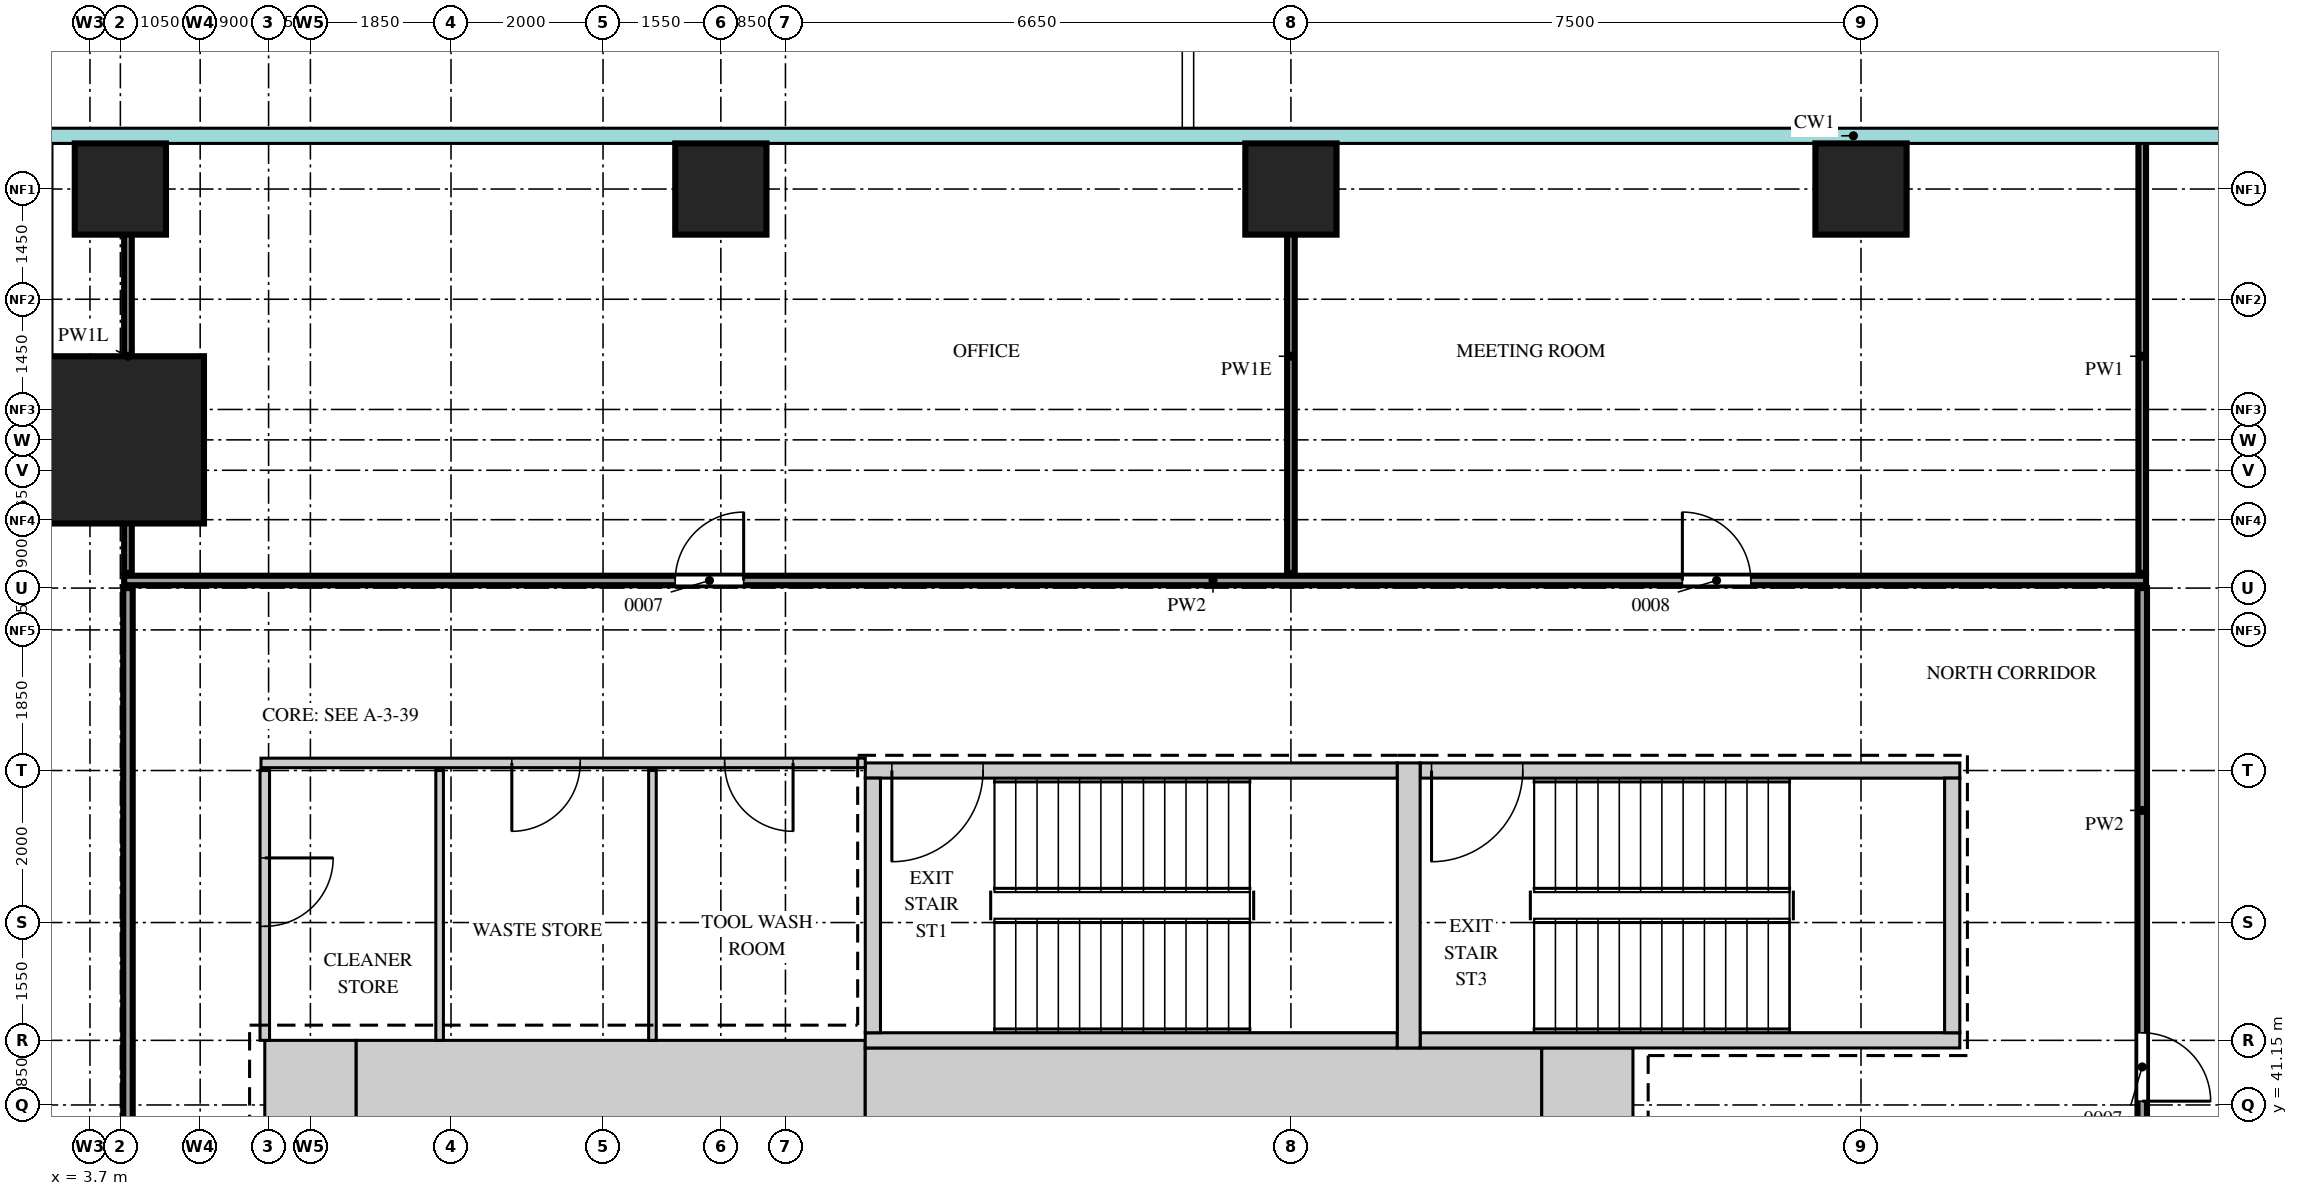
"""IFC4 building model, lengths in metres.
Left out: names, types, materials, properties, quantities, classifications, styles, units other than length and angle.
Written with IfcOpenShell. Run it as: python <this file> out.ifc"""

import sys

from ifc_helpers import new_model, si_unit, direction, frame, frame_2d, origin, origin_2d, place, context, subcontext, project, spatial, rectangle, extrude, source, transform, mapped, element, fill, save


model = new_model("IFC4")
c1 = context("Model", 3, precision=1e-05, world=origin(), true_north=direction((0.0, 1.0)))
c2 = subcontext(c1, "Body", "Model", "MODEL_VIEW")
j1 = project(units=[si_unit("LENGTHUNIT", "METRE"), si_unit("PLANEANGLEUNIT", "RADIAN")], contexts=[c1])
p1 = place(None, origin())
s1 = spatial("IfcSite", under=j1, at=p1, CompositionType="ELEMENT")
p2 = place(p1, origin())
s2 = spatial("IfcBuilding", under=s1, at=p2, CompositionType="ELEMENT")
p3 = place(p2, frame((0.0, 0.0, 69.0)))
s3 = spatial("IfcBuildingStorey", under=s2, at=p3, CompositionType="ELEMENT", Elevation=69.0)
m1 = source(origin(), c2, "Body", "SweptSolid", [
    extrude(rectangle(XDim=6.7, YDim=1.2, at=frame_2d((3.35, 0.0))), origin(), (0.0, 0.0, 1.0), 4.2),
])
p4 = place(p3, frame((7.2, 41.4, 0.0), z_axis=(0.0, 0.0, 1.0), x_axis=(1.0, 0.0, 0.0)))
e1 = element("IfcWall", 1, at=p4, inside=s3, PredefinedType="SHEAR", context=c2, shape_type="MappedRepresentation", body=[
    mapped(m1, transform((0.0, 0.0, 0.0))),
])
m2 = source(origin(), c2, "Body", "SweptSolid", [
    extrude(rectangle(XDim=8.9, YDim=1.1, at=frame_2d((4.45, 0.0))), origin(), (0.0, 0.0, 1.0), 4.2),
])
p5 = place(p3, frame((13.9, 41.35, 0.0), z_axis=(0.0, 0.0, 1.0), x_axis=(1.0, 0.0, 0.0)))
e2 = element("IfcWall", 2, at=p5, inside=s3, PredefinedType="SHEAR", context=c2, shape_type="MappedRepresentation", body=[
    mapped(m2, transform((0.0, 0.0, 0.0))),
])
m3 = source(origin(), c2, "Body", "SweptSolid", [
    extrude(rectangle(XDim=1.2, YDim=1.1, at=frame_2d((0.6, 0.0))), origin(), (0.0, 0.0, 1.0), 4.2),
])
p6 = place(p3, frame((22.8, 41.35, 0.0), z_axis=(0.0, 0.0, 1.0), x_axis=(1.0, 0.0, 0.0)))
e3 = element("IfcWall", 3, at=p6, inside=s3, PredefinedType="SHEAR", context=c2, shape_type="MappedRepresentation", body=[
    mapped(m3, transform((0.0, 0.0, 0.0))),
])
m4 = source(origin(), c2, "Body", "SweptSolid", [
    extrude(rectangle(XDim=1.2, YDim=1.2, at=frame_2d((0.6, 0.0))), origin(), (0.0, 0.0, 1.0), 4.2),
])
p7 = place(p3, frame((6.0, 41.4, 0.0), z_axis=(0.0, 0.0, 1.0), x_axis=(1.0, 0.0, 0.0)))
e4 = element("IfcWall", 4, at=p7, inside=s3, PredefinedType="SHEAR", context=c2, shape_type="MappedRepresentation", body=[
    mapped(m4, transform((0.0, 0.0, 0.0))),
])
m5 = source(origin(), c2, "Body", "SweptSolid", [
    extrude(rectangle(XDim=7.0, YDim=0.2, at=frame_2d((3.5, 0.0))), origin(), (0.0, 0.0, 1.0), 4.2),
])
p8 = place(p3, frame((13.9, 45.55, 0.0), z_axis=(0.0, 0.0, 1.0), x_axis=(1.0, 0.0, 0.0)))
e5 = element("IfcWall", 5, at=p8, inside=s3, PredefinedType="SHEAR", context=c2, shape_type="MappedRepresentation", body=[
    mapped(m5, transform((0.0, 0.0, 0.0))),
])
m6 = source(origin(), c2, "Body", "SweptSolid", [
    extrude(rectangle(XDim=1.2, YDim=2.1, at=frame_2d((0.6, 1.05))), frame((0.0, 0.11, 0.0), z_axis=(0.0, -1.0, 0.0), x_axis=(1.0, 0.0, 0.0)), (0.0, 0.0, 1.0), 0.22),
])
p9 = place(p8, frame((0.35, 0.0, 0.0)))
e6 = element("IfcOpeningElement", 6, at=p9, cuts=e5, PredefinedType="OPENING", context=c2, shape_type="MappedRepresentation", body=[
    mapped(m6, transform((0.0, 0.0, 0.0))),
])
p10 = place(p3, frame((13.9, 42.0, 0.0), z_axis=(0.0, 0.0, 1.0), x_axis=(1.0, 0.0, 0.0)))
e7 = element("IfcWall", 7, at=p10, inside=s3, PredefinedType="SHEAR", context=c2, shape_type="MappedRepresentation", body=[
    mapped(m5, transform((0.0, 0.0, 0.0))),
])
m7 = source(origin(), c2, "Body", "SweptSolid", [
    extrude(rectangle(XDim=7.1, YDim=0.2, at=frame_2d((3.55, 0.0))), origin(), (0.0, 0.0, 1.0), 4.2),
])
p11 = place(p3, frame((21.2, 45.55, 0.0), z_axis=(0.0, 0.0, 1.0), x_axis=(1.0, 0.0, 0.0)))
e8 = element("IfcWall", 8, at=p11, inside=s3, PredefinedType="SHEAR", context=c2, shape_type="MappedRepresentation", body=[
    mapped(m7, transform((0.0, 0.0, 0.0))),
])
p12 = place(p11, frame((0.15, 0.0, 0.0)))
e9 = element("IfcOpeningElement", 9, at=p12, cuts=e8, PredefinedType="OPENING", context=c2, shape_type="MappedRepresentation", body=[
    mapped(m6, transform((0.0, 0.0, 0.0))),
])
p13 = place(p3, frame((21.2, 42.0, 0.0), z_axis=(0.0, 0.0, 1.0), x_axis=(1.0, 0.0, 0.0)))
e10 = element("IfcWall", 10, at=p13, inside=s3, PredefinedType="SHEAR", context=c2, shape_type="MappedRepresentation", body=[
    mapped(m7, transform((0.0, 0.0, 0.0))),
])
m8 = source(origin(), c2, "Body", "SweptSolid", [
    extrude(rectangle(XDim=3.75, YDim=0.3, at=frame_2d((1.875, 0.0))), origin(), (0.0, 0.0, 1.0), 4.2),
])
p14 = place(p3, frame((21.05, 41.9, 0.0), z_axis=(0.0, 0.0, 1.0), x_axis=(0.0, 1.0, 0.0)))
e11 = element("IfcWall", 11, at=p14, inside=s3, PredefinedType="SHEAR", context=c2, shape_type="MappedRepresentation", body=[
    mapped(m8, transform((0.0, 0.0, 0.0))),
])
m9 = source(origin(), c2, "Body", "SweptSolid", [
    extrude(rectangle(XDim=3.35, YDim=0.2, at=frame_2d((1.675, 0.0))), origin(), (0.0, 0.0, 1.0), 4.2),
])
for number, where, z_axis, x_axis in (
    (12, (14.0, 42.1, 0.0), (0.0, 0.0, 1.0), (0.0, 1.0, 0.0)),
    (13, (28.2, 42.1, 0.0), (0.0, 0.0, 1.0), (0.0, 1.0, 0.0)),
):
    element("IfcWall", number, at=place(p3, frame(where, z_axis=z_axis, x_axis=x_axis)), inside=s3, PredefinedType="SHEAR", context=c2, shape_type="MappedRepresentation", body=[
        mapped(m9, transform((0.0, 0.0, 0.0))),
    ])
m10 = source(origin(), c2, "Body", "SweptSolid", [
    extrude(rectangle(XDim=2.2, YDim=2.2, at=origin_2d()), origin(), (0.0, 0.0, 1.0), 4.5),
])
p15 = place(p3, frame((4.1, 49.9, 0.0), z_axis=(0.0, 0.0, 1.0), x_axis=(1.0, 0.0, 0.0)))
e14 = element("IfcColumn", 14, at=p15, inside=s3, PredefinedType="COLUMN", context=c2, shape_type="MappedRepresentation", body=[
    mapped(m10, transform((0.0, 0.0, 0.0))),
])
m11 = source(origin(), c2, "Body", "SweptSolid", [
    extrude(rectangle(XDim=1.2, YDim=1.2, at=origin_2d()), origin(), (0.0, 0.0, 1.0), 4.2),
])
for number, where, z_axis, x_axis in (
    (15, (4.1, 53.2, 0.0), (0.0, 0.0, 1.0), (1.0, 0.0, 0.0)),
    (16, (12.0, 53.2, 0.0), (0.0, 0.0, 1.0), (1.0, 0.0, 0.0)),
    (17, (19.5, 53.2, 0.0), (0.0, 0.0, 1.0), (1.0, 0.0, 0.0)),
    (18, (27.0, 53.2, 0.0), (0.0, 0.0, 1.0), (1.0, 0.0, 0.0)),
):
    element("IfcColumn", number, at=place(p3, frame(where, z_axis=z_axis, x_axis=x_axis)), inside=s3, PredefinedType="COLUMN", context=c2, shape_type="MappedRepresentation", body=[
        mapped(m11, transform((0.0, 0.0, 0.0))),
    ])
m12 = source(origin(), c2, "Body", "SweptSolid", [
    extrude(rectangle(XDim=41.8, YDim=0.125, at=frame_2d((20.9, 0.0))), origin(), (0.0, 0.0, 1.0), 4.3),
])
p16 = place(p3, frame((4.2, 6.15, 0.0), z_axis=(0.0, 0.0, 1.0), x_axis=(0.0, 1.0, 0.0)))
e19 = element("IfcWall", 19, at=p16, inside=s3, PredefinedType="PARTITIONING", context=c2, shape_type="MappedRepresentation", body=[
    mapped(m12, transform((0.0, 0.0, 0.0))),
])
m13 = source(origin(), c2, "Body", "SweptSolid", [
    extrude(rectangle(XDim=0.9, YDim=2.1, at=frame_2d((0.45, 1.05))), frame((0.0, 0.073, 0.0), z_axis=(0.0, -1.0, 0.0), x_axis=(1.0, 0.0, 0.0)), (0.0, 0.0, 1.0), 0.145),
])
p17 = place(p16, frame((6.45, 0.0, 0.0)))
e20 = element("IfcOpeningElement", 20, at=p17, cuts=e19, PredefinedType="OPENING", context=c2, shape_type="MappedRepresentation", body=[
    mapped(m13, transform((0.0, 0.0, 0.0))),
])
m14 = source(origin(), c2, "Body", "SweptSolid", [
    extrude(rectangle(XDim=1.2, YDim=2.1, at=frame_2d((0.6, 1.05))), frame((0.0, 0.073, 0.0), z_axis=(0.0, -1.0, 0.0), x_axis=(1.0, 0.0, 0.0)), (0.0, 0.0, 1.0), 0.145),
])
p18 = place(p16, frame((25.05, 0.0, 0.0)))
e21 = element("IfcOpeningElement", 21, at=p18, cuts=e19, PredefinedType="OPENING", context=c2, shape_type="MappedRepresentation", body=[
    mapped(m14, transform((0.0, 0.0, 0.0))),
])
m15 = source(origin(), c2, "Body", "SweptSolid", [
    extrude(rectangle(XDim=10.15, YDim=0.125, at=frame_2d((5.075, 0.0))), origin(), (0.0, 0.0, 1.0), 4.3),
])
p19 = place(p3, frame((30.7, 37.8, 0.0), z_axis=(0.0, 0.0, 1.0), x_axis=(0.0, 1.0, 0.0)))
e22 = element("IfcWall", 22, at=p19, inside=s3, PredefinedType="PARTITIONING", context=c2, shape_type="MappedRepresentation", body=[
    mapped(m15, transform((0.0, 0.0, 0.0))),
])
p20 = place(p19, frame((3.4, 0.0, 0.0)))
e23 = element("IfcOpeningElement", 23, at=p20, cuts=e22, PredefinedType="OPENING", context=c2, shape_type="MappedRepresentation", body=[
    mapped(m13, transform((0.0, 0.0, 0.0))),
])
m16 = source(origin(), c2, "Body", "SweptSolid", [
    extrude(rectangle(XDim=3.55, YDim=0.125, at=frame_2d((1.775, 0.0))), origin(), (0.0, 0.0, 1.0), 4.3),
])
p21 = place(p3, frame((6.0, 42.0, 0.0), z_axis=(0.0, 0.0, 1.0), x_axis=(0.0, 1.0, 0.0)))
e24 = element("IfcWall", 24, at=p21, inside=s3, PredefinedType="PARTITIONING", context=c2, shape_type="MappedRepresentation", body=[
    mapped(m16, transform((0.0, 0.0, 0.0))),
])
p22 = place(p21, frame((1.5, 0.0, 0.0)))
e25 = element("IfcOpeningElement", 25, at=p22, cuts=e24, PredefinedType="OPENING", context=c2, shape_type="MappedRepresentation", body=[
    mapped(m13, transform((0.0, 0.0, 0.0))),
])
m17 = source(origin(), c2, "Body", "SweptSolid", [
    extrude(rectangle(XDim=3.55, YDim=0.1, at=frame_2d((1.775, 0.0))), origin(), (0.0, 0.0, 1.0), 4.3),
])
for number, where, z_axis, x_axis in (
    (26, (8.3, 42.0, 0.0), (0.0, 0.0, 1.0), (0.0, 1.0, 0.0)),
    (27, (11.1, 42.0, 0.0), (0.0, 0.0, 1.0), (0.0, 1.0, 0.0)),
):
    element("IfcWall", number, at=place(p3, frame(where, z_axis=z_axis, x_axis=x_axis)), inside=s3, PredefinedType="PARTITIONING", context=c2, shape_type="MappedRepresentation", body=[
        mapped(m17, transform((0.0, 0.0, 0.0))),
    ])
m18 = source(origin(), c2, "Body", "SweptSolid", [
    extrude(rectangle(XDim=7.95, YDim=0.125, at=frame_2d((3.975, 0.0))), origin(), (0.0, 0.0, 1.0), 4.3),
])
p23 = place(p3, frame((5.95, 45.65, 0.0), z_axis=(0.0, 0.0, 1.0), x_axis=(1.0, 0.0, 0.0)))
e28 = element("IfcWall", 28, at=p23, inside=s3, PredefinedType="PARTITIONING", context=c2, shape_type="MappedRepresentation", body=[
    mapped(m18, transform((0.0, 0.0, 0.0))),
])
p24 = place(p23, frame((3.3, 0.0, 0.0)))
e29 = element("IfcOpeningElement", 29, at=p24, cuts=e28, PredefinedType="OPENING", context=c2, shape_type="MappedRepresentation", body=[
    mapped(m13, transform((0.0, 0.0, 0.0))),
])
p25 = place(p23, frame((6.1, 0.0, 0.0)))
e30 = element("IfcOpeningElement", 30, at=p25, cuts=e28, PredefinedType="OPENING", context=c2, shape_type="MappedRepresentation", body=[
    mapped(m13, transform((0.0, 0.0, 0.0))),
])
m19 = source(origin(), c2, "Body", "SweptSolid", [
    extrude(rectangle(XDim=26.6, YDim=0.125, at=frame_2d((13.3, 0.0))), origin(), (0.0, 0.0, 1.0), 4.3),
])
p26 = place(p3, frame((4.15, 48.05, 0.0), z_axis=(0.0, 0.0, 1.0), x_axis=(1.0, 0.0, 0.0)))
e31 = element("IfcWall", 31, at=p26, inside=s3, PredefinedType="PARTITIONING", context=c2, shape_type="MappedRepresentation", body=[
    mapped(m19, transform((0.0, 0.0, 0.0))),
])
p27 = place(p26, frame((7.25, 0.0, 0.0)))
e32 = element("IfcOpeningElement", 32, at=p27, cuts=e31, PredefinedType="OPENING", context=c2, shape_type="MappedRepresentation", body=[
    mapped(m13, transform((0.0, 0.0, 0.0))),
])
p28 = place(p26, frame((20.5, 0.0, 0.0)))
e33 = element("IfcOpeningElement", 33, at=p28, cuts=e31, PredefinedType="OPENING", context=c2, shape_type="MappedRepresentation", body=[
    mapped(m13, transform((0.0, 0.0, 0.0))),
])
m20 = source(origin(), c2, "Body", "SweptSolid", [
    extrude(rectangle(XDim=5.7, YDim=0.1, at=frame_2d((2.85, 0.0))), origin(), (0.0, 0.0, 1.0), 3.6),
])
p29 = place(p3, frame((4.2, 48.15, 0.0), z_axis=(0.0, 0.0, 1.0), x_axis=(0.0, 1.0, 0.0)))
e34 = element("IfcWall", 34, at=p29, inside=s3, PredefinedType="PARTITIONING", context=c2, shape_type="MappedRepresentation", body=[
    mapped(m20, transform((0.0, 0.0, 0.0))),
])
m21 = source(origin(), c2, "Body", "SweptSolid", [
    extrude(rectangle(XDim=5.7, YDim=0.1, at=frame_2d((2.85, 0.0))), origin(), (0.0, 0.0, 1.0), 3.84),
])
p30 = place(p3, frame((19.5, 48.15, 0.0), z_axis=(0.0, 0.0, 1.0), x_axis=(0.0, 1.0, 0.0)))
e35 = element("IfcWall", 35, at=p30, inside=s3, PredefinedType="PARTITIONING", context=c2, shape_type="MappedRepresentation", body=[
    mapped(m21, transform((0.0, 0.0, 0.0))),
])
m22 = source(origin(), c2, "Body", "SweptSolid", [
    extrude(rectangle(XDim=5.7, YDim=0.1, at=frame_2d((2.85, 0.0))), origin(), (0.0, 0.0, 1.0), 4.3),
])
p31 = place(p3, frame((30.7, 48.15, 0.0), z_axis=(0.0, 0.0, 1.0), x_axis=(0.0, 1.0, 0.0)))
e36 = element("IfcWall", 36, at=p31, inside=s3, PredefinedType="PARTITIONING", context=c2, shape_type="MappedRepresentation", body=[
    mapped(m22, transform((0.0, 0.0, 0.0))),
])
m23 = source(origin(), c2, "Body", "SweptSolid", [
    extrude(rectangle(XDim=0.9, YDim=2.1, at=frame_2d((0.45, 1.05))), frame((0.0, 0.025, 0.0), z_axis=(0.0, -1.0, 0.0), x_axis=(1.0, 0.0, 0.0)), (0.0, 0.0, 1.0), 0.05),
])
p32 = place(p20, origin())
e37 = element("IfcDoor", 37, at=p32, inside=s3, OperationType="SINGLE_SWING_LEFT", PredefinedType="DOOR", context=c2, shape_type="MappedRepresentation", body=[
    mapped(m23, transform((0.0, 0.0, 0.0))),
])
fill(e23, e37)
p33 = place(p27, origin())
e38 = element("IfcDoor", 38, at=p33, inside=s3, OperationType="SINGLE_SWING_LEFT", PredefinedType="DOOR", context=c2, shape_type="MappedRepresentation", body=[
    mapped(m23, transform((0.0, 0.0, 0.0))),
])
fill(e32, e38)
p34 = place(p28, origin())
e39 = element("IfcDoor", 39, at=p34, inside=s3, OperationType="SINGLE_SWING_RIGHT", PredefinedType="DOOR", context=c2, shape_type="MappedRepresentation", body=[
    mapped(m23, transform((0.0, 0.0, 0.0))),
])
fill(e33, e39)
p35 = place(p22, origin())
e40 = element("IfcDoor", 40, at=p35, inside=s3, OperationType="SINGLE_SWING_RIGHT", PredefinedType="DOOR", context=c2, shape_type="MappedRepresentation", body=[
    mapped(m23, transform((0.0, 0.0, 0.0))),
])
fill(e25, e40)
p36 = place(p24, origin())
e41 = element("IfcDoor", 41, at=p36, inside=s3, OperationType="SINGLE_SWING_LEFT", PredefinedType="DOOR", context=c2, shape_type="MappedRepresentation", body=[
    mapped(m23, transform((0.0, 0.0, 0.0))),
])
fill(e29, e41)
p37 = place(p25, origin())
e42 = element("IfcDoor", 42, at=p37, inside=s3, OperationType="SINGLE_SWING_RIGHT", PredefinedType="DOOR", context=c2, shape_type="MappedRepresentation", body=[
    mapped(m23, transform((0.0, 0.0, 0.0))),
])
fill(e30, e42)
m24 = source(origin(), c2, "Body", "SweptSolid", [
    extrude(rectangle(XDim=1.2, YDim=2.1, at=frame_2d((0.6, 1.05))), frame((0.0, 0.025, 0.0), z_axis=(0.0, -1.0, 0.0), x_axis=(1.0, 0.0, 0.0)), (0.0, 0.0, 1.0), 0.05),
])
p38 = place(p9, origin())
e43 = element("IfcDoor", 43, at=p38, inside=s3, OperationType="SINGLE_SWING_LEFT", PredefinedType="DOOR", context=c2, shape_type="MappedRepresentation", body=[
    mapped(m24, transform((0.0, 0.0, 0.0))),
])
fill(e6, e43)
p39 = place(p12, origin())
e44 = element("IfcDoor", 44, at=p39, inside=s3, OperationType="SINGLE_SWING_LEFT", PredefinedType="DOOR", context=c2, shape_type="MappedRepresentation", body=[
    mapped(m24, transform((0.0, 0.0, 0.0))),
])
fill(e9, e44)
save(model, sys.argv[1])
